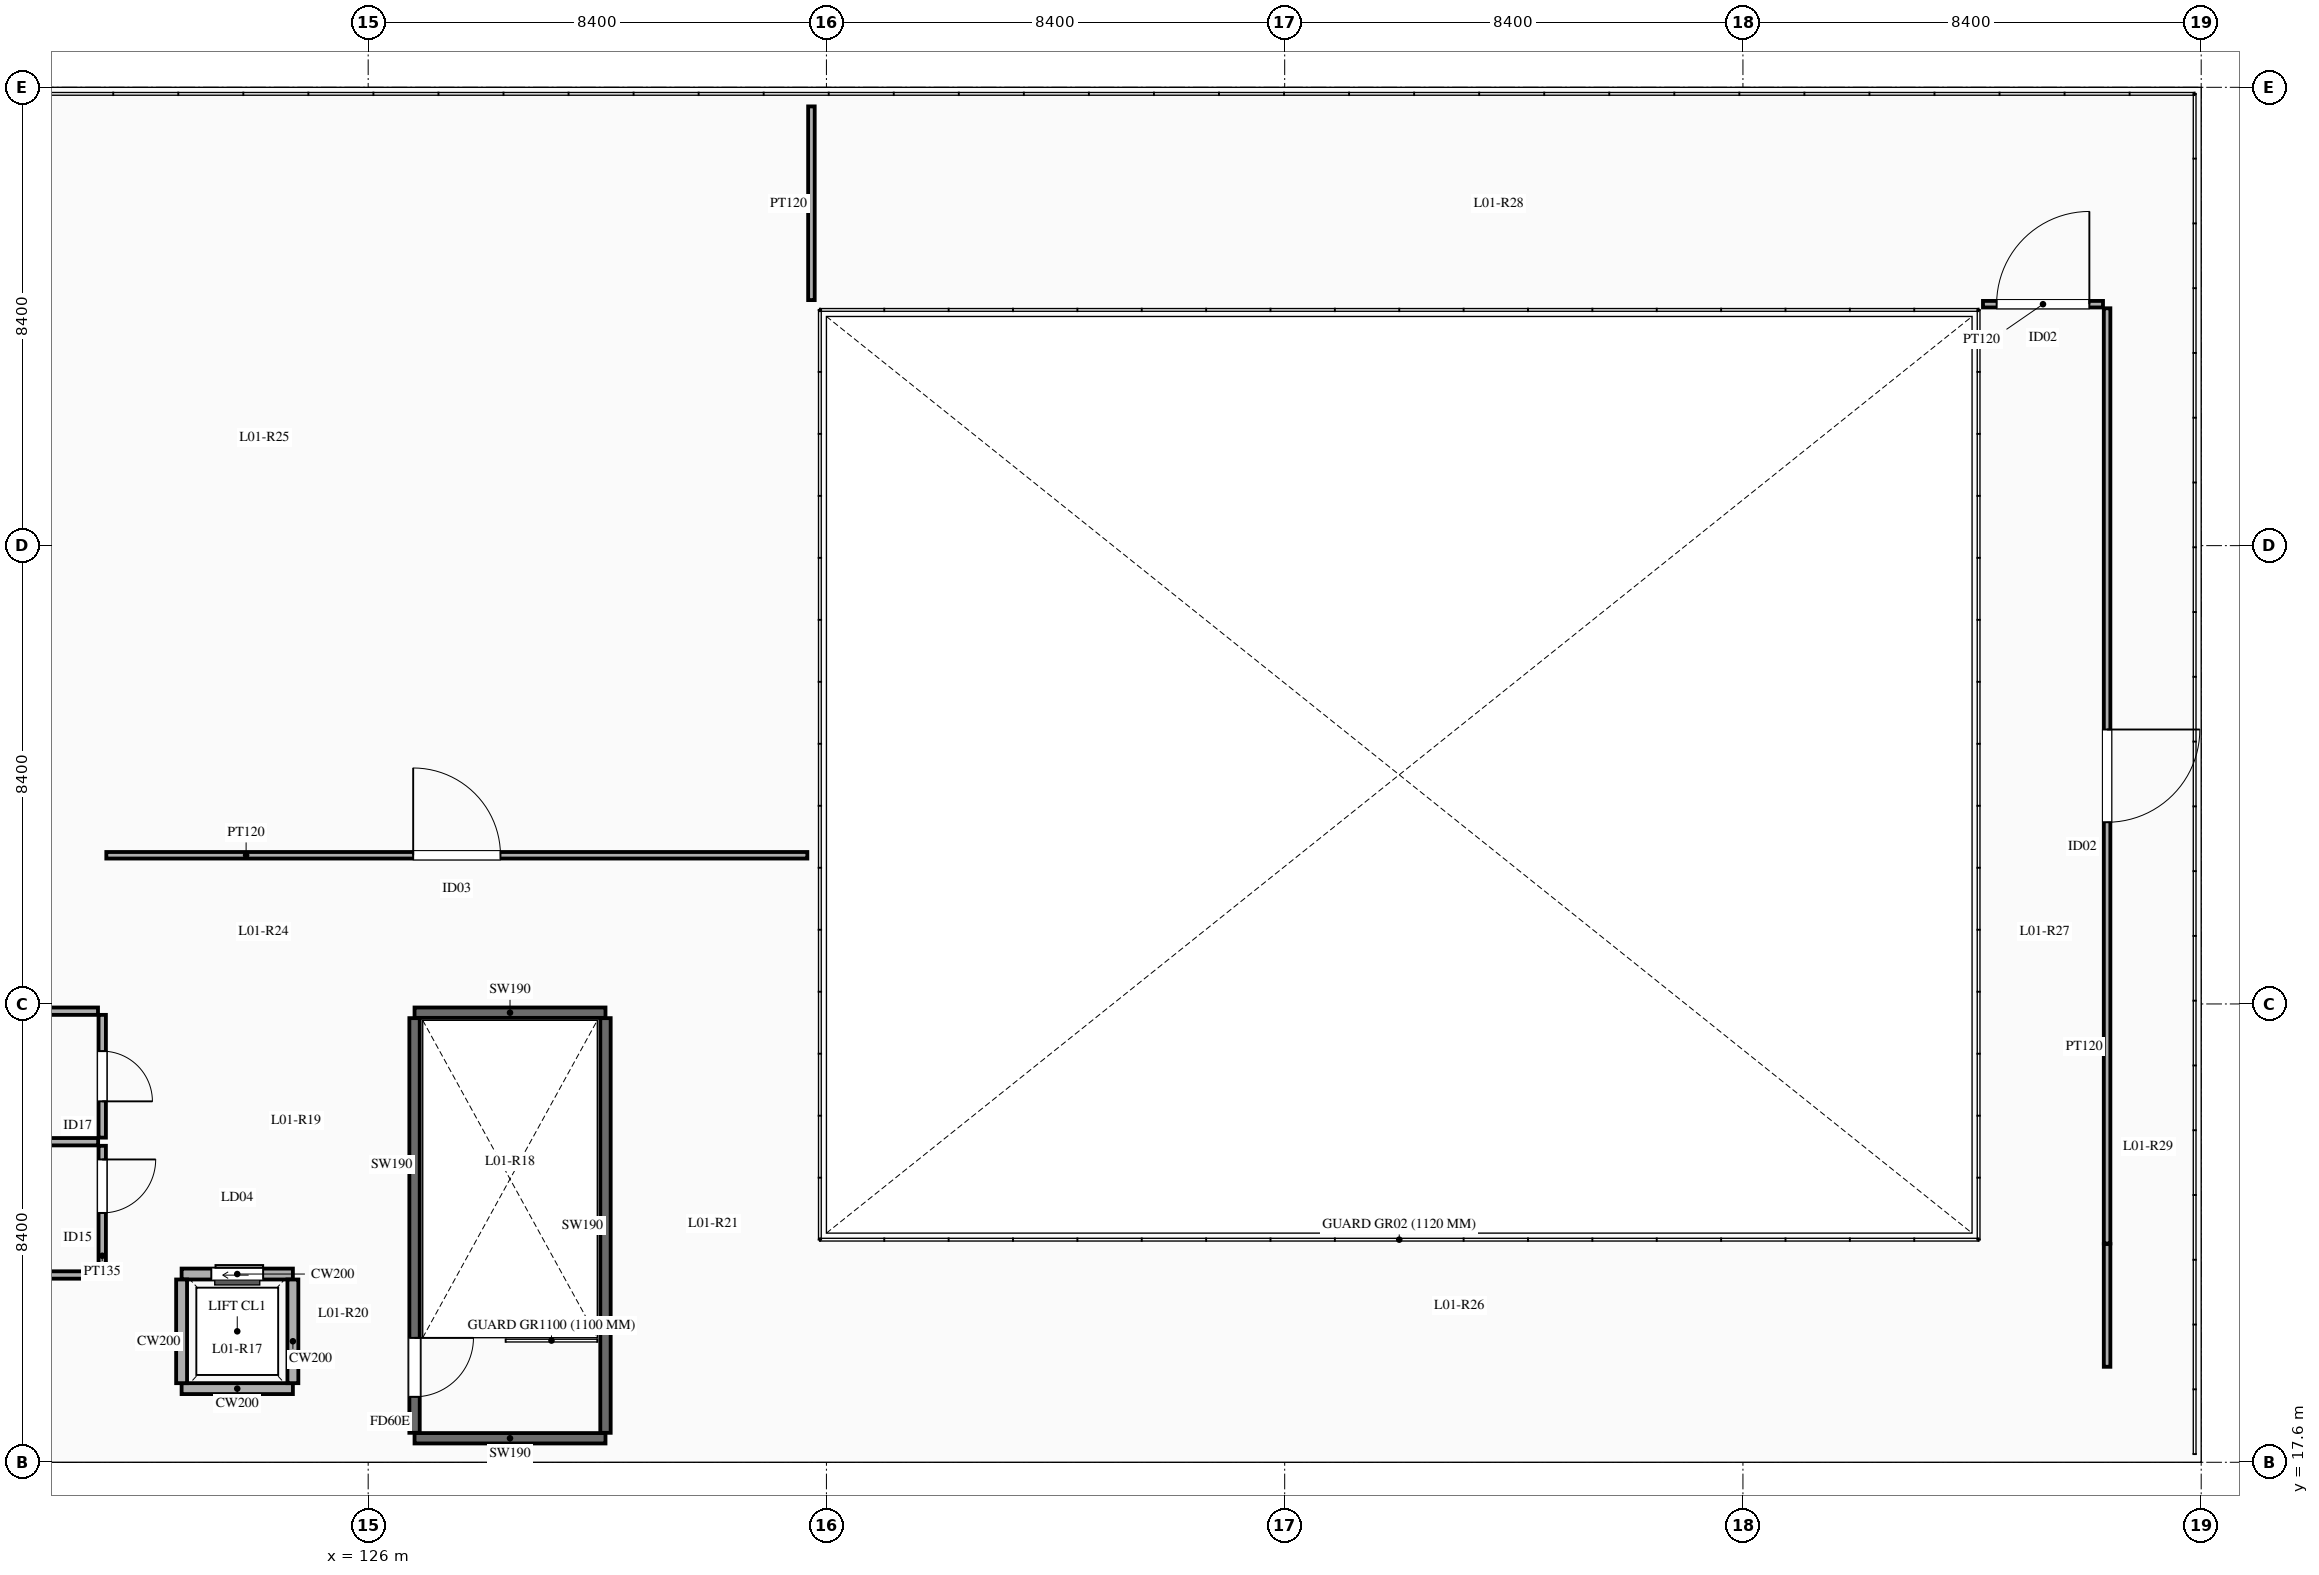
"""IFC4 building model, lengths in metres.
Left out: names, types, materials, properties, quantities, classifications, styles, units other than length and angle.
Written with IfcOpenShell. Run it as: python <this file> out.ifc"""

import sys

from ifc_helpers import new_model, si_unit, direction, frame, frame_2d, origin, place, context, subcontext, project, spatial, rectangle, extrude, element, fill, save


model = new_model("IFC4")
c1 = context("Model", 3, precision=1e-05, world=origin(), true_north=direction((0.0, 1.0)))
c2 = subcontext(c1, "Body", "Model", "MODEL_VIEW")
j1 = project(units=[si_unit("LENGTHUNIT", "METRE"), si_unit("PLANEANGLEUNIT", "RADIAN")], contexts=[c1])
p1 = place(None, origin())
s1 = spatial("IfcSite", under=j1, at=p1, CompositionType="ELEMENT")
p2 = place(p1, origin())
s2 = spatial("IfcBuilding", under=s1, at=p2, CompositionType="ELEMENT")
p3 = place(p2, frame((0.0, 0.0, 5.4)))
s3 = spatial("IfcBuildingStorey", under=s2, at=p3, CompositionType="ELEMENT", Elevation=5.4)
p4 = place(p3, frame((122.58, 21.05, 0.0), z_axis=(0.0, 0.0, 1.0), x_axis=(1.0, 0.0, 0.0)))
e1 = element("IfcWall", 1, at=p4, inside=s3, PredefinedType="SOLIDWALL", context=c2, shape_type="SweptSolid", body=[
    extrude(rectangle(XDim=2.04, YDim=0.2, at=frame_2d((1.02, 0.0))), origin(), (0.0, 0.0, 1.0), 4.58),
])
p5 = place(p4, frame((0.545, 0.0, 0.0)))
e2 = element("IfcOpeningElement", 2, at=p5, cuts=e1, PredefinedType="OPENING", context=c2, shape_type="SweptSolid", body=[
    extrude(rectangle(XDim=0.95, YDim=2.15, at=frame_2d((0.475, 1.075))), frame((0.0, 0.11, 0.0), z_axis=(0.0, -1.0, 0.0), x_axis=(1.0, 0.0, 0.0)), (0.0, 0.0, 1.0), 0.22),
])
p6 = place(p3, frame((122.58, 18.95, 0.0), z_axis=(0.0, 0.0, 1.0), x_axis=(1.0, 0.0, 0.0)))
e3 = element("IfcWall", 3, at=p6, inside=s3, PredefinedType="SOLIDWALL", context=c2, shape_type="SweptSolid", body=[
    extrude(rectangle(XDim=2.04, YDim=0.2, at=frame_2d((1.02, 0.0))), origin(), (0.0, 0.0, 1.0), 4.58),
])
for number, where, z_axis, x_axis in (
    (4, (122.58, 19.05, 0.0), (0.0, 0.0, 1.0), (0.0, 1.0, 0.0)),
    (5, (124.62, 19.05, 0.0), (0.0, 0.0, 1.0), (0.0, 1.0, 0.0)),
):
    element("IfcWall", number, at=place(p3, frame(where, z_axis=z_axis, x_axis=x_axis)), inside=s3, PredefinedType="SOLIDWALL", context=c2, shape_type="SweptSolid", body=[
        extrude(rectangle(XDim=1.9, YDim=0.2, at=frame_2d((0.95, 0.0))), origin(), (0.0, 0.0, 1.0), 4.58),
    ])
for number, where, z_axis, x_axis in (
    (6, (126.85, 18.04, 0.0), (0.0, 0.0, 1.0), (1.0, 0.0, 0.0)),
    (7, (126.85, 25.84, 0.0), (0.0, 0.0, 1.0), (1.0, 0.0, 0.0)),
):
    element("IfcWall", number, at=place(p3, frame(where, z_axis=z_axis, x_axis=x_axis)), inside=s3, PredefinedType="SOLIDWALL", context=c2, shape_type="SweptSolid", body=[
        extrude(rectangle(XDim=3.5, YDim=0.19, at=frame_2d((1.75, 0.0))), origin(), (0.0, 0.0, 1.0), 4.58),
    ])
p7 = place(p3, frame((126.85, 18.14, 0.0), z_axis=(0.0, 0.0, 1.0), x_axis=(0.0, 1.0, 0.0)))
e8 = element("IfcWall", 8, at=p7, inside=s3, PredefinedType="SOLIDWALL", context=c2, shape_type="SweptSolid", body=[
    extrude(rectangle(XDim=7.6, YDim=0.19, at=frame_2d((3.8, 0.0))), origin(), (0.0, 0.0, 1.0), 4.58),
])
p8 = place(p7, frame((0.66, 0.0, 0.0)))
e9 = element("IfcOpeningElement", 9, at=p8, cuts=e8, PredefinedType="OPENING", context=c2, shape_type="SweptSolid", body=[
    extrude(rectangle(XDim=1.08, YDim=2.15, at=frame_2d((0.54, 1.075))), frame((0.0, 0.105, 0.0), z_axis=(0.0, -1.0, 0.0), x_axis=(1.0, 0.0, 0.0)), (0.0, 0.0, 1.0), 0.21),
])
p9 = place(p3, frame((130.35, 18.14, 0.0), z_axis=(0.0, 0.0, 1.0), x_axis=(0.0, 1.0, 0.0)))
e10 = element("IfcWall", 10, at=p9, inside=s3, PredefinedType="SOLIDWALL", context=c2, shape_type="SweptSolid", body=[
    extrude(rectangle(XDim=7.6, YDim=0.19, at=frame_2d((3.8, 0.0))), origin(), (0.0, 0.0, 1.0), 4.58),
])
p10 = place(p3, frame((121.125, 21.1, 0.0), z_axis=(0.0, 0.0, 1.0), x_axis=(0.0, 1.0, 0.0)))
e11 = element("IfcWall", 11, at=p10, inside=s3, PredefinedType="PARTITIONING", context=c2, shape_type="SweptSolid", body=[
    extrude(rectangle(XDim=2.3, YDim=0.135, at=frame_2d((1.15, 0.0))), origin(), (0.0, 0.0, 1.0), 2.95),
])
p11 = place(p10, frame((1.07, 0.0, 0.0)))
e12 = element("IfcOpeningElement", 12, at=p11, cuts=e11, PredefinedType="OPENING", context=c2, shape_type="SweptSolid", body=[
    extrude(rectangle(XDim=0.98, YDim=2.15, at=frame_2d((0.49, 1.075))), frame((0.0, 0.077, 0.0), z_axis=(0.0, -1.0, 0.0), x_axis=(1.0, 0.0, 0.0)), (0.0, 0.0, 1.0), 0.155),
])
p12 = place(p3, frame((121.125, 23.55, 0.0), z_axis=(0.0, 0.0, 1.0), x_axis=(0.0, 1.0, 0.0)))
e13 = element("IfcWall", 13, at=p12, inside=s3, PredefinedType="PARTITIONING", context=c2, shape_type="SweptSolid", body=[
    extrude(rectangle(XDim=2.25, YDim=0.135, at=frame_2d((1.125, 0.0))), origin(), (0.0, 0.0, 1.0), 2.95),
])
p13 = place(p12, frame((0.665, 0.0, 0.0)))
e14 = element("IfcOpeningElement", 14, at=p13, cuts=e13, PredefinedType="OPENING", context=c2, shape_type="SweptSolid", body=[
    extrude(rectangle(XDim=0.92, YDim=2.12, at=frame_2d((0.46, 1.06))), frame((0.0, 0.077, 0.0), z_axis=(0.0, -1.0, 0.0), x_axis=(1.0, 0.0, 0.0)), (0.0, 0.0, 1.0), 0.155),
])
p14 = place(p3, frame((118.0, 23.475, 0.0), z_axis=(0.0, 0.0, 1.0), x_axis=(1.0, 0.0, 0.0)))
e15 = element("IfcWall", 15, at=p14, inside=s3, PredefinedType="PARTITIONING", context=c2, shape_type="SweptSolid", body=[
    extrude(rectangle(XDim=3.05, YDim=0.135, at=frame_2d((1.525, 0.0))), origin(), (0.0, 0.0, 1.0), 2.95),
])
p15 = place(p3, frame((121.2, 28.725, 0.0), z_axis=(0.0, 0.0, 1.0), x_axis=(1.0, 0.0, 0.0)))
e16 = element("IfcWall", 16, at=p15, inside=s3, PredefinedType="PARTITIONING", context=c2, shape_type="SweptSolid", body=[
    extrude(rectangle(XDim=12.85, YDim=0.12, at=frame_2d((6.425, 0.0))), origin(), (0.0, 0.0, 1.0), 2.95),
])
p16 = place(p15, frame((5.625, 0.0, 0.0)))
e17 = element("IfcOpeningElement", 17, at=p16, cuts=e16, PredefinedType="OPENING", context=c2, shape_type="SweptSolid", body=[
    extrude(rectangle(XDim=1.6, YDim=2.35, at=frame_2d((0.8, 1.175))), frame((0.0, 0.07, 0.0), z_axis=(0.0, -1.0, 0.0), x_axis=(1.0, 0.0, 0.0)), (0.0, 0.0, 1.0), 0.14),
])
p17 = place(p3, frame((134.125, 38.9, 0.0), z_axis=(0.0, 0.0, 1.0), x_axis=(0.0, 1.0, 0.0)))
e18 = element("IfcWall", 18, at=p17, inside=s3, PredefinedType="PARTITIONING", context=c2, shape_type="SweptSolid", body=[
    extrude(rectangle(XDim=3.55, YDim=0.12, at=frame_2d((1.775, 0.0))), origin(), (0.0, 0.0, 1.0), 2.95),
])
p18 = place(p3, frame((157.875, 19.35, 0.0), z_axis=(0.0, 0.0, 1.0), x_axis=(0.0, 1.0, 0.0)))
e19 = element("IfcWall", 19, at=p18, inside=s3, PredefinedType="PARTITIONING", context=c2, shape_type="SweptSolid", body=[
    extrude(rectangle(XDim=2.25, YDim=0.12, at=frame_2d((1.125, 0.0))), origin(), (0.0, 0.0, 1.0), 2.95),
])
p19 = place(p3, frame((155.6, 38.825, 0.0), z_axis=(0.0, 0.0, 1.0), x_axis=(1.0, 0.0, 0.0)))
e20 = element("IfcWall", 20, at=p19, inside=s3, PredefinedType="PARTITIONING", context=c2, shape_type="SweptSolid", body=[
    extrude(rectangle(XDim=2.2, YDim=0.12, at=frame_2d((1.1, 0.0))), origin(), (0.0, 0.0, 1.0), 2.95),
])
p20 = place(p19, frame((0.25, 0.0, 0.0)))
e21 = element("IfcOpeningElement", 21, at=p20, cuts=e20, PredefinedType="OPENING", context=c2, shape_type="SweptSolid", body=[
    extrude(rectangle(XDim=1.7, YDim=2.4, at=frame_2d((0.85, 1.2))), frame((0.0, 0.07, 0.0), z_axis=(0.0, -1.0, 0.0), x_axis=(1.0, 0.0, 0.0)), (0.0, 0.0, 1.0), 0.14),
])
p21 = place(p3, frame((157.875, 21.61, 0.0), z_axis=(0.0, 0.0, 1.0), x_axis=(0.0, 1.0, 0.0)))
e22 = element("IfcWall", 22, at=p21, inside=s3, PredefinedType="PARTITIONING", context=c2, shape_type="SweptSolid", body=[
    extrude(rectangle(XDim=17.14, YDim=0.12, at=frame_2d((8.57, 0.0))), origin(), (0.0, 0.0, 1.0), 2.95),
])
p22 = place(p21, frame((7.72, 0.0, 0.0)))
e23 = element("IfcOpeningElement", 23, at=p22, cuts=e22, PredefinedType="OPENING", context=c2, shape_type="SweptSolid", body=[
    extrude(rectangle(XDim=1.7, YDim=2.4, at=frame_2d((0.85, 1.2))), frame((0.0, 0.07, 0.0), z_axis=(0.0, -1.0, 0.0), x_axis=(1.0, 0.0, 0.0)), (0.0, 0.0, 1.0), 0.14),
])
for number, where, z_axis, x_axis in (
    (24, (118.0, 21.032, 0.0), (0.0, 0.0, 1.0), (1.0, 0.0, 0.0)),
    (25, (118.0, 25.867, 0.0), (0.0, 0.0, 1.0), (1.0, 0.0, 0.0)),
):
    element("IfcWall", number, at=place(p3, frame(where, z_axis=z_axis, x_axis=x_axis)), inside=s3, PredefinedType="PARTITIONING", context=c2, shape_type="SweptSolid", body=[
        extrude(rectangle(XDim=3.048, YDim=0.135, at=frame_2d((1.524, 0.0))), origin(), (0.0, 0.0, 1.0), 2.95),
    ])
p23 = place(p5, origin())
e26 = element("IfcDoor", 26, at=p23, inside=s3, OperationType="SLIDING_TO_LEFT", PredefinedType="DOOR", context=c2, shape_type="SweptSolid", body=[
    extrude(rectangle(XDim=0.95, YDim=2.15, at=frame_2d((0.475, 1.075))), frame((0.0, 0.025, 0.0), z_axis=(0.0, -1.0, 0.0), x_axis=(1.0, 0.0, 0.0)), (0.0, 0.0, 1.0), 0.05),
])
fill(e2, e26)
p24 = place(p8, frame((1.08, 0.0, 0.0), z_axis=(0.0, 0.0, 1.0), x_axis=(-1.0, 0.0, 0.0)))
e27 = element("IfcDoor", 27, at=p24, inside=s3, OperationType="SINGLE_SWING_LEFT", PredefinedType="DOOR", context=c2, shape_type="SweptSolid", body=[
    extrude(rectangle(XDim=1.08, YDim=2.15, at=frame_2d((0.54, 1.075))), frame((0.0, 0.025, 0.0), z_axis=(0.0, -1.0, 0.0), x_axis=(1.0, 0.0, 0.0)), (0.0, 0.0, 1.0), 0.05),
])
fill(e9, e27)
p25 = place(p11, frame((0.98, 0.0, 0.0), z_axis=(0.0, 0.0, 1.0), x_axis=(-1.0, 0.0, 0.0)))
e28 = element("IfcDoor", 28, at=p25, inside=s3, OperationType="SINGLE_SWING_LEFT", PredefinedType="DOOR", context=c2, shape_type="SweptSolid", body=[
    extrude(rectangle(XDim=0.98, YDim=2.15, at=frame_2d((0.49, 1.075))), frame((0.0, 0.025, 0.0), z_axis=(0.0, -1.0, 0.0), x_axis=(1.0, 0.0, 0.0)), (0.0, 0.0, 1.0), 0.05),
])
fill(e12, e28)
p26 = place(p13, frame((0.92, 0.0, 0.0), z_axis=(0.0, 0.0, 1.0), x_axis=(-1.0, 0.0, 0.0)))
e29 = element("IfcDoor", 29, at=p26, inside=s3, OperationType="SINGLE_SWING_RIGHT", PredefinedType="DOOR", context=c2, shape_type="SweptSolid", body=[
    extrude(rectangle(XDim=0.92, YDim=2.12, at=frame_2d((0.46, 1.06))), frame((0.0, 0.025, 0.0), z_axis=(0.0, -1.0, 0.0), x_axis=(1.0, 0.0, 0.0)), (0.0, 0.0, 1.0), 0.05),
])
fill(e14, e29)
p27 = place(p16, origin())
e30 = element("IfcDoor", 30, at=p27, inside=s3, OperationType="SINGLE_SWING_LEFT", PredefinedType="DOOR", context=c2, shape_type="SweptSolid", body=[
    extrude(rectangle(XDim=1.6, YDim=2.35, at=frame_2d((0.8, 1.175))), frame((0.0, 0.025, 0.0), z_axis=(0.0, -1.0, 0.0), x_axis=(1.0, 0.0, 0.0)), (0.0, 0.0, 1.0), 0.05),
])
fill(e17, e30)
p28 = place(p20, origin())
e31 = element("IfcDoor", 31, at=p28, inside=s3, OperationType="SINGLE_SWING_RIGHT", PredefinedType="DOOR", context=c2, shape_type="SweptSolid", body=[
    extrude(rectangle(XDim=1.7, YDim=2.4, at=frame_2d((0.85, 1.2))), frame((0.0, 0.025, 0.0), z_axis=(0.0, -1.0, 0.0), x_axis=(1.0, 0.0, 0.0)), (0.0, 0.0, 1.0), 0.05),
])
fill(e21, e31)
p29 = place(p22, frame((1.7, 0.0, 0.0), z_axis=(0.0, 0.0, 1.0), x_axis=(-1.0, 0.0, 0.0)))
e32 = element("IfcDoor", 32, at=p29, inside=s3, OperationType="SINGLE_SWING_LEFT", PredefinedType="DOOR", context=c2, shape_type="SweptSolid", body=[
    extrude(rectangle(XDim=1.7, YDim=2.4, at=frame_2d((0.85, 1.2))), frame((0.0, 0.025, 0.0), z_axis=(0.0, -1.0, 0.0), x_axis=(1.0, 0.0, 0.0)), (0.0, 0.0, 1.0), 0.05),
])
fill(e23, e32)
save(model, sys.argv[1])
